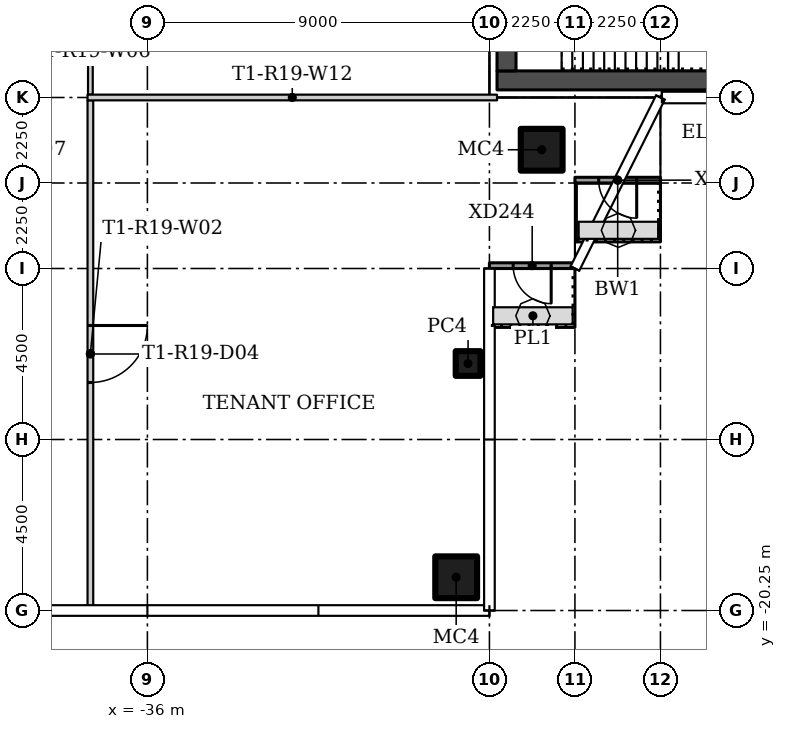
"""IFC4 building model, lengths in metres.
Left out: names, types, materials, properties, quantities, classifications, styles, units other than length and angle.
Written with IfcOpenShell. Run it as: python <this file> out.ifc"""

import sys

from ifc_helpers import new_model, si_unit, direction, frame, frame_2d, origin, origin_2d, place, context, subcontext, project, spatial, rectangle, hollow_rectangle, extrude, element, fill, save


model = new_model("IFC4")
c1 = context("Model", 3, precision=1e-05, world=origin(), true_north=direction((0.0, 1.0)))
c2 = subcontext(c1, "Body", "Model", "MODEL_VIEW")
j1 = project(units=[si_unit("LENGTHUNIT", "METRE"), si_unit("PLANEANGLEUNIT", "RADIAN")], contexts=[c1])
p1 = place(None, origin())
s1 = spatial("IfcSite", under=j1, at=p1, CompositionType="ELEMENT")
p2 = place(p1, origin())
s2 = spatial("IfcBuilding", under=s1, at=p2, CompositionType="ELEMENT")
p3 = place(p2, frame((0.0, 0.0, 170.1)))
s3 = spatial("IfcBuildingStorey", under=s2, at=p3, CompositionType="ELEMENT", Elevation=170.1)
p4 = place(p3, frame((-25.625, -8.125, 0.0)))
e1 = element("IfcColumn", 1, at=p4, inside=s3, PredefinedType="COLUMN", context=c2, shape_type="SweptSolid", body=[
    extrude(hollow_rectangle(XDim=1.1, YDim=1.1, WallThickness=0.04, at=origin_2d()), origin(), (0.0, 0.0, 1.0), 3.55),
])
p5 = place(p3, frame((-27.562, -13.75, 0.0)))
e2 = element("IfcColumn", 2, at=p5, inside=s3, PredefinedType="COLUMN", context=c2, shape_type="SweptSolid", body=[
    extrude(hollow_rectangle(XDim=0.65, YDim=0.65, WallThickness=0.02, at=origin_2d()), origin(), (0.0, 0.0, 1.0), 3.55),
])
p6 = place(p3, frame((-27.875, -19.375, 0.0)))
e3 = element("IfcColumn", 3, at=p6, inside=s3, PredefinedType="COLUMN", context=c2, shape_type="SweptSolid", body=[
    extrude(hollow_rectangle(XDim=1.1, YDim=1.1, WallThickness=0.04, at=origin_2d()), origin(), (0.0, 0.0, 1.0), 3.55),
])
p7 = place(p3, frame((-37.5, -6.825, 0.0), z_axis=(0.0, 0.0, 1.0), x_axis=(0.0, -1.0, 0.0)))
e4 = element("IfcWall", 4, at=p7, inside=s3, PredefinedType="PARTITIONING", context=c2, shape_type="SweptSolid", body=[
    extrude(rectangle(XDim=13.33, YDim=0.15, at=frame_2d((6.665, 0.0))), origin(), (0.0, 0.0, 1.0), 3.55),
])
p8 = place(p7, frame((5.925, 0.0, 0.0)))
e5 = element("IfcOpeningElement", 5, at=p8, cuts=e4, PredefinedType="OPENING", context=c2, shape_type="SweptSolid", body=[
    extrude(rectangle(XDim=1.5, YDim=2.1, at=frame_2d((0.75, 1.05))), frame((0.0, 0.085, 0.0), z_axis=(0.0, -1.0, 0.0), x_axis=(1.0, 0.0, 0.0)), (0.0, 0.0, 1.0), 0.17),
])
p9 = place(p3, frame((-37.5, -6.675, 0.0), z_axis=(0.0, 0.0, 1.0), x_axis=(0.0, 1.0, 0.0)))
e6 = element("IfcWall", 6, at=p9, inside=s3, PredefinedType="PARTITIONING", context=c2, shape_type="SweptSolid", body=[
    extrude(rectangle(XDim=6.662, YDim=0.125, at=frame_2d((3.331, 0.0))), origin(), (0.0, 0.0, 1.0), 3.55),
])
p10 = place(p9, frame((4.915, 0.0, 0.0)))
e7 = element("IfcOpeningElement", 7, at=p10, cuts=e6, PredefinedType="OPENING", context=c2, shape_type="SweptSolid", body=[
    extrude(rectangle(XDim=0.9, YDim=2.1, at=frame_2d((0.45, 1.05))), frame((0.0, 0.073, 0.0), z_axis=(0.0, -1.0, 0.0), x_axis=(1.0, 0.0, 0.0)), (0.0, 0.0, 1.0), 0.145),
])
p11 = place(p3, frame((-26.8, -6.75, 0.0), z_axis=(0.0, 0.0, 1.0), x_axis=(-1.0, 0.0, 0.0)))
e8 = element("IfcWall", 8, at=p11, inside=s3, PredefinedType="PARTITIONING", context=c2, shape_type="SweptSolid", body=[
    extrude(rectangle(XDim=10.775, YDim=0.15, at=frame_2d((5.387, 0.0))), origin(), (0.0, 0.0, 1.0), 3.55),
])
p12 = place(p3, frame((-22.5, -8.925, 0.0), z_axis=(0.0, 0.0, 1.0), x_axis=(-1.0, 0.0, 0.0)))
e9 = element("IfcWall", 9, at=p12, inside=s3, PredefinedType="SOLIDWALL", context=c2, shape_type="SweptSolid", body=[
    extrude(rectangle(XDim=2.25, YDim=0.15, at=frame_2d((1.125, 0.0))), origin(), (0.0, 0.0, 1.0), 3.45),
])
p13 = place(p12, frame((0.625, 0.0, 0.0)))
e10 = element("IfcOpeningElement", 10, at=p13, cuts=e9, PredefinedType="OPENING", context=c2, shape_type="SweptSolid", body=[
    extrude(rectangle(XDim=1.0, YDim=2.4, at=frame_2d((0.5, 1.2))), frame((0.0, 0.085, 0.0), z_axis=(0.0, -1.0, 0.0), x_axis=(1.0, 0.0, 0.0)), (0.0, 0.0, 1.0), 0.17),
])
p14 = place(p3, frame((-24.75, -11.175, 0.0), z_axis=(0.0, 0.0, 1.0), x_axis=(-1.0, 0.0, 0.0)))
e11 = element("IfcWall", 11, at=p14, inside=s3, PredefinedType="SOLIDWALL", context=c2, shape_type="SweptSolid", body=[
    extrude(rectangle(XDim=2.25, YDim=0.15, at=frame_2d((1.125, 0.0))), origin(), (0.0, 0.0, 1.0), 3.45),
])
p15 = place(p14, frame((0.625, 0.0, 0.0)))
e12 = element("IfcOpeningElement", 12, at=p15, cuts=e11, PredefinedType="OPENING", context=c2, shape_type="SweptSolid", body=[
    extrude(rectangle(XDim=1.0, YDim=2.4, at=frame_2d((0.5, 1.2))), frame((0.0, 0.085, 0.0), z_axis=(0.0, -1.0, 0.0), x_axis=(1.0, 0.0, 0.0)), (0.0, 0.0, 1.0), 0.17),
])
p16 = place(p3, frame((-26.8, -6.3, 0.0)))
e13 = element("IfcWall", 13, at=p16, inside=s3, PredefinedType="SHEAR", context=c2, shape_type="SweptSolid", body=[
    extrude(rectangle(XDim=13.1, YDim=0.5, at=frame_2d((6.55, 0.0))), origin(), (0.0, 0.0, 1.0), 3.55),
])
p17 = place(p3, frame((-26.55, 6.05, 0.0), z_axis=(0.0, 0.0, 1.0), x_axis=(0.0, -1.0, 0.0)))
e14 = element("IfcWall", 14, at=p17, inside=s3, PredefinedType="SHEAR", context=c2, shape_type="SweptSolid", body=[
    extrude(rectangle(XDim=12.1, YDim=0.5, at=frame_2d((6.05, 0.0))), origin(), (0.0, 0.0, 1.0), 3.55),
])
p18 = place(p17, frame((3.9, 0.0, 0.0)))
e15 = element("IfcOpeningElement", 15, at=p18, cuts=e14, PredefinedType="OPENING", context=c2, shape_type="SweptSolid", body=[
    extrude(rectangle(XDim=1.8, YDim=2.4, at=frame_2d((0.9, 1.2))), frame((0.0, 0.26, 0.0), z_axis=(0.0, -1.0, 0.0), x_axis=(1.0, 0.0, 0.0)), (0.0, 0.0, 1.0), 0.52),
])
p19 = place(p8, origin())
e16 = element("IfcDoor", 16, at=p19, inside=s3, OperationType="DOUBLE_DOOR_SINGLE_SWING", PredefinedType="DOOR", context=c2, shape_type="SweptSolid", body=[
    extrude(rectangle(XDim=1.5, YDim=2.1, at=frame_2d((0.75, 1.05))), frame((0.0, 0.025, 0.0), z_axis=(0.0, -1.0, 0.0), x_axis=(1.0, 0.0, 0.0)), (0.0, 0.0, 1.0), 0.05),
])
fill(e5, e16)
p20 = place(p13, origin())
e17 = element("IfcDoor", 17, at=p20, inside=s3, OperationType="SINGLE_SWING_RIGHT", PredefinedType="DOOR", context=c2, shape_type="SweptSolid", body=[
    extrude(rectangle(XDim=1.0, YDim=2.4, at=frame_2d((0.5, 1.2))), frame((0.0, 0.025, 0.0), z_axis=(0.0, -1.0, 0.0), x_axis=(1.0, 0.0, 0.0)), (0.0, 0.0, 1.0), 0.05),
])
fill(e10, e17)
p21 = place(p15, origin())
e18 = element("IfcDoor", 18, at=p21, inside=s3, OperationType="SINGLE_SWING_LEFT", PredefinedType="DOOR", context=c2, shape_type="SweptSolid", body=[
    extrude(rectangle(XDim=1.0, YDim=2.4, at=frame_2d((0.5, 1.2))), frame((0.0, 0.025, 0.0), z_axis=(0.0, -1.0, 0.0), x_axis=(1.0, 0.0, 0.0)), (0.0, 0.0, 1.0), 0.05),
])
fill(e12, e18)
save(model, sys.argv[1])
